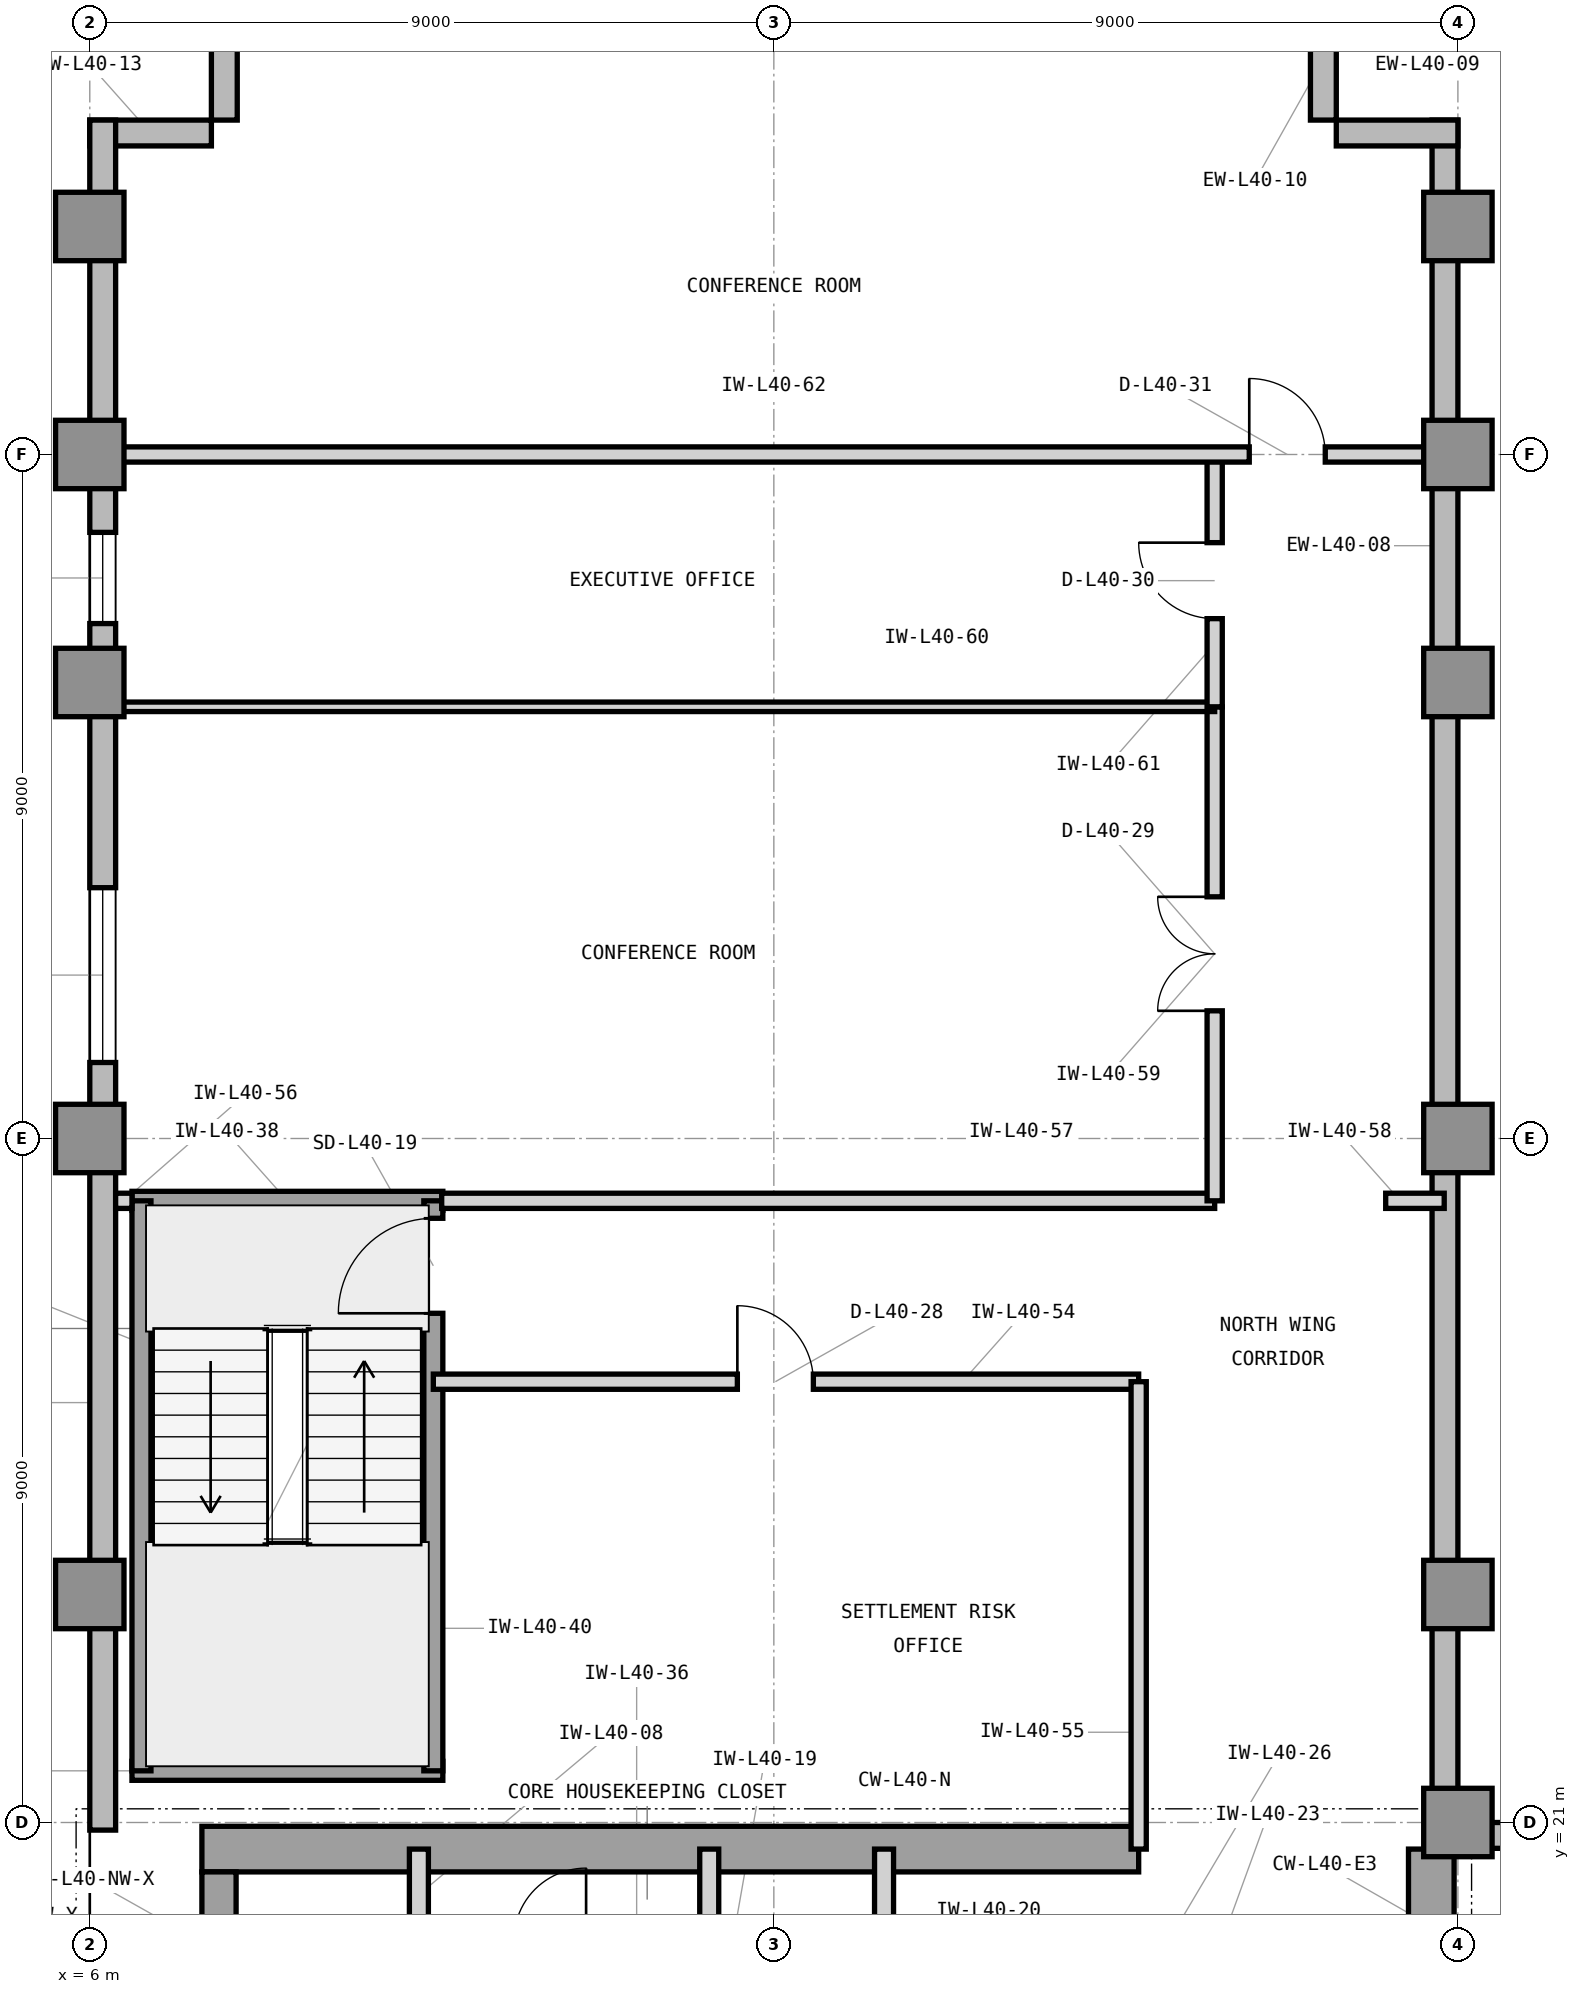
"""IFC4 building model, lengths in metres.
Left out: names, types, materials, properties, quantities, classifications, styles, units other than length and angle.
Written with IfcOpenShell. Run it as: python <this file> out.ifc"""

import sys

from ifc_helpers import new_model, si_unit, direction, frame, frame_2d, origin, origin_2d, place, context, subcontext, project, spatial, rectangle, extrude, element, fill, save


model = new_model("IFC4")
c1 = context("Model", 3, precision=1e-05, world=origin(), true_north=direction((0.0, 1.0)))
c2 = subcontext(c1, "Body", "Model", "MODEL_VIEW")
j1 = project(units=[si_unit("LENGTHUNIT", "METRE"), si_unit("PLANEANGLEUNIT", "RADIAN")], contexts=[c1])
p1 = place(None, origin())
s1 = spatial("IfcSite", under=j1, at=p1, CompositionType="ELEMENT")
p2 = place(p1, origin())
s2 = spatial("IfcBuilding", under=s1, at=p2, CompositionType="ELEMENT")
p3 = place(p2, frame((0.0, 0.0, 168.3)))
s3 = spatial("IfcBuildingStorey", under=s2, at=p3, CompositionType="ELEMENT", Elevation=168.3)
p4 = place(p3, frame((7.475, 20.65, 0.0), z_axis=(0.0, 0.0, 1.0), x_axis=(1.0, 0.0, 0.0)))
e1 = element("IfcWall", 1, at=p4, inside=s3, PredefinedType="SHEAR", context=c2, shape_type="SweptSolid", body=[
    extrude(rectangle(XDim=12.325, YDim=0.6, at=frame_2d((6.163, 0.0))), origin(), (0.0, 0.0, 1.0), 3.9),
])
p5 = place(p3, frame((23.65, 16.6, 0.0), z_axis=(0.0, 0.0, 1.0), x_axis=(0.0, 1.0, 0.0)))
e2 = element("IfcWall", 2, at=p5, inside=s3, PredefinedType="SHEAR", context=c2, shape_type="SweptSolid", body=[
    extrude(rectangle(XDim=4.05, YDim=0.6, at=frame_2d((2.025, 0.0))), origin(), (0.0, 0.0, 1.0), 3.9),
])
p6 = place(p3, frame((7.7, 19.575, 0.0), z_axis=(0.0, 0.0, 1.0), x_axis=(0.0, 1.0, 0.0)))
e3 = element("IfcWall", 3, at=p6, inside=s3, PredefinedType="SHEAR", context=c2, shape_type="SweptSolid", body=[
    extrude(rectangle(XDim=0.775, YDim=0.45, at=frame_2d((0.388, 0.0))), origin(), (0.0, 0.0, 1.0), 3.9),
])
for number, where, z_axis, x_axis in (
    (4, (24.0, 21.0, 0.0), (0.0, 0.0, 1.0), (1.0, 0.0, 0.0)),
    (5, (6.0, 24.0, 0.0), (0.0, 0.0, 1.0), (1.0, 0.0, 0.0)),
    (6, (24.0, 24.0, 0.0), (0.0, 0.0, 1.0), (1.0, 0.0, 0.0)),
    (7, (6.0, 30.0, 0.0), (0.0, 0.0, 1.0), (1.0, 0.0, 0.0)),
    (8, (24.0, 30.0, 0.0), (0.0, 0.0, 1.0), (1.0, 0.0, 0.0)),
    (9, (6.0, 36.0, 0.0), (0.0, 0.0, 1.0), (1.0, 0.0, 0.0)),
    (10, (24.0, 36.0, 0.0), (0.0, 0.0, 1.0), (1.0, 0.0, 0.0)),
    (11, (6.0, 39.0, 0.0), (0.0, 0.0, 1.0), (1.0, 0.0, 0.0)),
    (12, (24.0, 39.0, 0.0), (0.0, 0.0, 1.0), (1.0, 0.0, 0.0)),
    (13, (6.0, 42.0, 0.0), (0.0, 0.0, 1.0), (1.0, 0.0, 0.0)),
    (14, (24.0, 42.0, 0.0), (0.0, 0.0, 1.0), (1.0, 0.0, 0.0)),
):
    element("IfcColumn", number, at=place(p3, frame(where, z_axis=z_axis, x_axis=x_axis)), inside=s3, PredefinedType="COLUMN", context=c2, shape_type="SweptSolid", body=[
        extrude(rectangle(XDim=0.9, YDim=0.9, at=origin_2d()), origin(), (0.0, 0.0, 1.0), 3.9),
    ])
p7 = place(p3, frame((55.4, 20.83, 0.0), z_axis=(0.0, 0.0, 1.0), x_axis=(-1.0, 0.0, 0.0)))
e15 = element("IfcWall", 15, at=p7, inside=s3, PredefinedType="STANDARD", context=c2, shape_type="SweptSolid", body=[
    extrude(rectangle(XDim=31.4, YDim=0.34, at=frame_2d((15.7, 0.0))), origin(), (0.0, 0.0, 1.0), 3.7),
])
p8 = place(p7, frame((17.167, 0.0, 0.9)))
e16 = element("IfcOpeningElement", 16, at=p8, cuts=e15, PredefinedType="OPENING", context=c2, shape_type="SweptSolid", body=[
    extrude(rectangle(XDim=2.3, YDim=2.2, at=frame_2d((1.15, 1.1))), frame((0.0, 0.18, 0.0), z_axis=(0.0, -1.0, 0.0), x_axis=(1.0, 0.0, 0.0)), (0.0, 0.0, 1.0), 0.36),
])
p9 = place(p7, frame((29.046, 0.0, 0.9)))
e17 = element("IfcOpeningElement", 17, at=p9, cuts=e15, PredefinedType="OPENING", context=c2, shape_type="SweptSolid", body=[
    extrude(rectangle(XDim=1.6, YDim=2.2, at=frame_2d((0.8, 1.1))), frame((0.0, 0.18, 0.0), z_axis=(0.0, -1.0, 0.0), x_axis=(1.0, 0.0, 0.0)), (0.0, 0.0, 1.0), 0.36),
])
p10 = place(p7, frame((8.675, 0.0, 0.9)))
e18 = element("IfcOpeningElement", 18, at=p10, cuts=e15, PredefinedType="OPENING", context=c2, shape_type="SweptSolid", body=[
    extrude(rectangle(XDim=2.3, YDim=2.2, at=frame_2d((1.15, 1.1))), frame((0.0, 0.18, 0.0), z_axis=(0.0, -1.0, 0.0), x_axis=(1.0, 0.0, 0.0)), (0.0, 0.0, 1.0), 0.36),
])
p11 = place(p3, frame((23.83, 21.0, 0.0), z_axis=(0.0, 0.0, 1.0), x_axis=(0.0, 1.0, 0.0)))
e19 = element("IfcWall", 19, at=p11, inside=s3, PredefinedType="STANDARD", context=c2, shape_type="SweptSolid", body=[
    extrude(rectangle(XDim=22.4, YDim=0.34, at=frame_2d((11.2, 0.0))), origin(), (0.0, 0.0, 1.0), 3.7),
])
for number, where, z_axis, x_axis in (
    (20, (24.0, 43.23, 0.0), (0.0, 0.0, 1.0), (-1.0, 0.0, 0.0)),
    (21, (22.23, 43.4, 0.0), (0.0, 0.0, 1.0), (0.0, 1.0, 0.0)),
    (22, (7.77, 45.0, 0.0), (0.0, 0.0, 1.0), (0.0, -1.0, 0.0)),
    (23, (7.6, 43.23, 0.0), (0.0, 0.0, 1.0), (-1.0, 0.0, 0.0)),
):
    element("IfcWall", number, at=place(p3, frame(where, z_axis=z_axis, x_axis=x_axis)), inside=s3, PredefinedType="STANDARD", context=c2, shape_type="SweptSolid", body=[
        extrude(rectangle(XDim=1.6, YDim=0.34, at=frame_2d((0.8, 0.0))), origin(), (0.0, 0.0, 1.0), 3.7),
    ])
p12 = place(p3, frame((6.17, 43.4, 0.0), z_axis=(0.0, 0.0, 1.0), x_axis=(0.0, -1.0, 0.0)))
e24 = element("IfcWall", 24, at=p12, inside=s3, PredefinedType="STANDARD", context=c2, shape_type="SweptSolid", body=[
    extrude(rectangle(XDim=22.5, YDim=0.34, at=frame_2d((11.25, 0.0))), origin(), (0.0, 0.0, 1.0), 3.7),
])
p13 = place(p12, frame((10.1, 0.0, 0.9)))
e25 = element("IfcOpeningElement", 25, at=p13, cuts=e24, PredefinedType="OPENING", context=c2, shape_type="SweptSolid", body=[
    extrude(rectangle(XDim=2.3, YDim=2.2, at=frame_2d((1.15, 1.1))), frame((0.0, 0.18, 0.0), z_axis=(0.0, -1.0, 0.0), x_axis=(1.0, 0.0, 0.0)), (0.0, 0.0, 1.0), 0.36),
])
p14 = place(p12, frame((5.425, 0.0, 0.9)))
e26 = element("IfcOpeningElement", 26, at=p14, cuts=e24, PredefinedType="OPENING", context=c2, shape_type="SweptSolid", body=[
    extrude(rectangle(XDim=1.2, YDim=2.2, at=frame_2d((0.6, 1.1))), frame((0.0, 0.18, 0.0), z_axis=(0.0, -1.0, 0.0), x_axis=(1.0, 0.0, 0.0)), (0.0, 0.0, 1.0), 0.36),
])
p15 = place(p3, frame((10.33, 19.45, 0.0), z_axis=(0.0, 0.0, 1.0), x_axis=(0.0, 1.0, 0.0)))
e27 = element("IfcWall", 27, at=p15, inside=s3, PredefinedType="PARTITIONING", context=c2, shape_type="SweptSolid", body=[
    extrude(rectangle(XDim=1.2, YDim=0.25, at=frame_2d((0.6, 0.0))), origin(), (0.0, 0.0, 1.0), 3.073),
])
for number, where, z_axis, x_axis in (
    (28, (14.15, 16.7, 0.0), (0.0, 0.0, 1.0), (0.0, 1.0, 0.0)),
    (29, (16.45, 16.7, 0.0), (0.0, 0.0, 1.0), (0.0, 1.0, 0.0)),
):
    element("IfcWall", number, at=place(p3, frame(where, z_axis=z_axis, x_axis=x_axis)), inside=s3, PredefinedType="PARTITIONING", context=c2, shape_type="SweptSolid", body=[
        extrude(rectangle(XDim=3.95, YDim=0.25, at=frame_2d((1.975, 0.0))), origin(), (0.0, 0.0, 1.0), 3.69),
    ])
for number, where, z_axis, x_axis in (
    (30, (6.555, 21.68, 0.0), (0.0, 0.0, 1.0), (1.0, 0.0, 0.0)),
    (31, (6.555, 29.18, 0.0), (0.0, 0.0, 1.0), (1.0, 0.0, 0.0)),
):
    element("IfcWall", number, at=place(p3, frame(where, z_axis=z_axis, x_axis=x_axis)), inside=s3, PredefinedType="SHEAR", context=c2, shape_type="SweptSolid", body=[
        extrude(rectangle(XDim=4.09, YDim=0.25, at=frame_2d((2.045, 0.0))), origin(), (0.0, 0.0, 1.0), 3.9),
    ])
p16 = place(p3, frame((6.68, 21.68, 0.0), z_axis=(0.0, 0.0, 1.0), x_axis=(0.0, 1.0, 0.0)))
e32 = element("IfcWall", 32, at=p16, inside=s3, PredefinedType="SHEAR", context=c2, shape_type="SweptSolid", body=[
    extrude(rectangle(XDim=7.5, YDim=0.25, at=frame_2d((3.75, 0.0))), origin(), (0.0, 0.0, 1.0), 3.9),
])
p17 = place(p3, frame((10.52, 21.68, 0.0), z_axis=(0.0, 0.0, 1.0), x_axis=(0.0, 1.0, 0.0)))
e33 = element("IfcWall", 33, at=p17, inside=s3, PredefinedType="SHEAR", context=c2, shape_type="SweptSolid", body=[
    extrude(rectangle(XDim=7.5, YDim=0.25, at=frame_2d((3.75, 0.0))), origin(), (0.0, 0.0, 1.0), 3.9),
])
p18 = place(p17, frame((6.02, 0.0, 0.0)))
e34 = element("IfcOpeningElement", 34, at=p18, cuts=e33, PredefinedType="OPENING", context=c2, shape_type="SweptSolid", body=[
    extrude(rectangle(XDim=1.25, YDim=2.2, at=frame_2d((0.625, 1.1))), frame((0.0, 0.135, 0.0), z_axis=(0.0, -1.0, 0.0), x_axis=(1.0, 0.0, 0.0)), (0.0, 0.0, 1.0), 0.27),
])
p19 = place(p3, frame((10.52, 26.8, 0.0), z_axis=(0.0, 0.0, 1.0), x_axis=(1.0, 0.0, 0.0)))
e35 = element("IfcWall", 35, at=p19, inside=s3, PredefinedType="PARTITIONING", context=c2, shape_type="SweptSolid", body=[
    extrude(rectangle(XDim=9.28, YDim=0.2, at=frame_2d((4.64, 0.0))), origin(), (0.0, 0.0, 1.0), 3.69),
])
p20 = place(p19, frame((4.0, 0.0, 0.0)))
e36 = element("IfcOpeningElement", 36, at=p20, cuts=e35, PredefinedType="OPENING", context=c2, shape_type="SweptSolid", body=[
    extrude(rectangle(XDim=1.0, YDim=2.15, at=frame_2d((0.5, 1.075))), frame((0.0, 0.11, 0.0), z_axis=(0.0, -1.0, 0.0), x_axis=(1.0, 0.0, 0.0)), (0.0, 0.0, 1.0), 0.22),
])
p21 = place(p3, frame((19.8, 20.65, 0.0), z_axis=(0.0, 0.0, 1.0), x_axis=(0.0, 1.0, 0.0)))
e37 = element("IfcWall", 37, at=p21, inside=s3, PredefinedType="PARTITIONING", context=c2, shape_type="SweptSolid", body=[
    extrude(rectangle(XDim=6.15, YDim=0.2, at=frame_2d((3.075, 0.0))), origin(), (0.0, 0.0, 1.0), 3.69),
])
p22 = place(p3, frame((6.34, 29.18, 0.0), z_axis=(0.0, 0.0, 1.0), x_axis=(1.0, 0.0, 0.0)))
e38 = element("IfcWall", 38, at=p22, inside=s3, PredefinedType="PARTITIONING", context=c2, shape_type="SweptSolid", body=[
    extrude(rectangle(XDim=0.215, YDim=0.2, at=frame_2d((0.107, 0.0))), origin(), (0.0, 0.0, 1.0), 3.69),
])
p23 = place(p3, frame((10.63, 29.18, 0.0), z_axis=(0.0, 0.0, 1.0), x_axis=(1.0, 0.0, 0.0)))
e39 = element("IfcWall", 39, at=p23, inside=s3, PredefinedType="PARTITIONING", context=c2, shape_type="SweptSolid", body=[
    extrude(rectangle(XDim=10.17, YDim=0.2, at=frame_2d((5.085, 0.0))), origin(), (0.0, 0.0, 1.0), 3.69),
])
p24 = place(p3, frame((23.05, 29.18, 0.0), z_axis=(0.0, 0.0, 1.0), x_axis=(1.0, 0.0, 0.0)))
e40 = element("IfcWall", 40, at=p24, inside=s3, PredefinedType="PARTITIONING", context=c2, shape_type="SweptSolid", body=[
    extrude(rectangle(XDim=0.77, YDim=0.2, at=frame_2d((0.385, 0.0))), origin(), (0.0, 0.0, 1.0), 3.69),
])
p25 = place(p3, frame((20.8, 29.18, 0.0), z_axis=(0.0, 0.0, 1.0), x_axis=(0.0, 1.0, 0.0)))
e41 = element("IfcWall", 41, at=p25, inside=s3, PredefinedType="PARTITIONING", context=c2, shape_type="SweptSolid", body=[
    extrude(rectangle(XDim=6.5, YDim=0.2, at=frame_2d((3.25, 0.0))), origin(), (0.0, 0.0, 1.0), 3.69),
])
p26 = place(p25, frame((2.5, 0.0, 0.0)))
e42 = element("IfcOpeningElement", 42, at=p26, cuts=e41, PredefinedType="OPENING", context=c2, shape_type="SweptSolid", body=[
    extrude(rectangle(XDim=1.5, YDim=2.3, at=frame_2d((0.75, 1.15))), frame((0.0, 0.11, 0.0), z_axis=(0.0, -1.0, 0.0), x_axis=(1.0, 0.0, 0.0)), (0.0, 0.0, 1.0), 0.22),
])
p27 = place(p3, frame((6.18, 35.68, 0.0), z_axis=(0.0, 0.0, 1.0), x_axis=(1.0, 0.0, 0.0)))
e43 = element("IfcWall", 43, at=p27, inside=s3, PredefinedType="PARTITIONING", context=c2, shape_type="SweptSolid", body=[
    extrude(rectangle(XDim=14.62, YDim=0.125, at=frame_2d((7.31, 0.0))), origin(), (0.0, 0.0, 1.0), 3.69),
])
p28 = place(p3, frame((20.8, 35.68, 0.0), z_axis=(0.0, 0.0, 1.0), x_axis=(0.0, 1.0, 0.0)))
e44 = element("IfcWall", 44, at=p28, inside=s3, PredefinedType="PARTITIONING", context=c2, shape_type="SweptSolid", body=[
    extrude(rectangle(XDim=3.32, YDim=0.2, at=frame_2d((1.66, 0.0))), origin(), (0.0, 0.0, 1.0), 3.69),
])
p29 = place(p28, frame((1.16, 0.0, 0.0)))
e45 = element("IfcOpeningElement", 45, at=p29, cuts=e44, PredefinedType="OPENING", context=c2, shape_type="SweptSolid", body=[
    extrude(rectangle(XDim=1.0, YDim=2.15, at=frame_2d((0.5, 1.075))), frame((0.0, 0.11, 0.0), z_axis=(0.0, -1.0, 0.0), x_axis=(1.0, 0.0, 0.0)), (0.0, 0.0, 1.0), 0.22),
])
p30 = place(p3, frame((6.18, 39.0, 0.0), z_axis=(0.0, 0.0, 1.0), x_axis=(1.0, 0.0, 0.0)))
e46 = element("IfcWall", 46, at=p30, inside=s3, PredefinedType="PARTITIONING", context=c2, shape_type="SweptSolid", body=[
    extrude(rectangle(XDim=17.64, YDim=0.2, at=frame_2d((8.82, 0.0))), origin(), (0.0, 0.0, 1.0), 3.073),
])
p31 = place(p30, frame((15.075, 0.0, 0.0)))
e47 = element("IfcOpeningElement", 47, at=p31, cuts=e46, PredefinedType="OPENING", context=c2, shape_type="SweptSolid", body=[
    extrude(rectangle(XDim=1.0, YDim=2.15, at=frame_2d((0.5, 1.075))), frame((0.0, 0.11, 0.0), z_axis=(0.0, -1.0, 0.0), x_axis=(1.0, 0.0, 0.0)), (0.0, 0.0, 1.0), 0.22),
])
p32 = place(p13, origin())
e48 = element("IfcWindow", 48, at=p32, inside=s3, PartitioningType="SINGLE_PANEL", PredefinedType="WINDOW", context=c2, shape_type="SweptSolid", body=[
    extrude(rectangle(XDim=2.3, YDim=2.2, at=frame_2d((1.15, 1.1))), frame((0.0, 0.11, 0.0), z_axis=(0.0, -1.0, 0.0), x_axis=(1.0, 0.0, 0.0)), (0.0, 0.0, 1.0), 0.06),
])
fill(e25, e48)
p33 = place(p18, origin())
e49 = element("IfcDoor", 49, at=p33, inside=s3, OperationType="SINGLE_SWING_LEFT", PredefinedType="DOOR", context=c2, shape_type="SweptSolid", body=[
    extrude(rectangle(XDim=1.25, YDim=2.2, at=frame_2d((0.625, 1.1))), frame((0.0, 0.025, 0.0), z_axis=(0.0, -1.0, 0.0), x_axis=(1.0, 0.0, 0.0)), (0.0, 0.0, 1.0), 0.05),
])
fill(e34, e49)
p34 = place(p20, origin())
e50 = element("IfcDoor", 50, at=p34, inside=s3, OperationType="SINGLE_SWING_LEFT", PredefinedType="DOOR", context=c2, shape_type="SweptSolid", body=[
    extrude(rectangle(XDim=1.0, YDim=2.15, at=frame_2d((0.5, 1.075))), frame((0.0, 0.025, 0.0), z_axis=(0.0, -1.0, 0.0), x_axis=(1.0, 0.0, 0.0)), (0.0, 0.0, 1.0), 0.05),
])
fill(e36, e50)
p35 = place(p26, origin())
e51 = element("IfcDoor", 51, at=p35, inside=s3, OperationType="DOUBLE_DOOR_SINGLE_SWING", PredefinedType="DOOR", context=c2, shape_type="SweptSolid", body=[
    extrude(rectangle(XDim=1.5, YDim=2.3, at=frame_2d((0.75, 1.15))), frame((0.0, 0.025, 0.0), z_axis=(0.0, -1.0, 0.0), x_axis=(1.0, 0.0, 0.0)), (0.0, 0.0, 1.0), 0.05),
])
fill(e42, e51)
p36 = place(p29, origin())
e52 = element("IfcDoor", 52, at=p36, inside=s3, OperationType="SINGLE_SWING_RIGHT", PredefinedType="DOOR", context=c2, shape_type="SweptSolid", body=[
    extrude(rectangle(XDim=1.0, YDim=2.15, at=frame_2d((0.5, 1.075))), frame((0.0, 0.025, 0.0), z_axis=(0.0, -1.0, 0.0), x_axis=(1.0, 0.0, 0.0)), (0.0, 0.0, 1.0), 0.05),
])
fill(e45, e52)
p37 = place(p31, origin())
e53 = element("IfcDoor", 53, at=p37, inside=s3, OperationType="SINGLE_SWING_LEFT", PredefinedType="DOOR", context=c2, shape_type="SweptSolid", body=[
    extrude(rectangle(XDim=1.0, YDim=2.15, at=frame_2d((0.5, 1.075))), frame((0.0, 0.025, 0.0), z_axis=(0.0, -1.0, 0.0), x_axis=(1.0, 0.0, 0.0)), (0.0, 0.0, 1.0), 0.05),
])
fill(e47, e53)
p38 = place(p14, origin())
e54 = element("IfcWindow", 54, at=p38, inside=s3, PartitioningType="SINGLE_PANEL", PredefinedType="WINDOW", context=c2, shape_type="SweptSolid", body=[
    extrude(rectangle(XDim=1.2, YDim=2.2, at=frame_2d((0.6, 1.1))), frame((0.0, 0.11, 0.0), z_axis=(0.0, -1.0, 0.0), x_axis=(1.0, 0.0, 0.0)), (0.0, 0.0, 1.0), 0.06),
])
fill(e26, e54)
save(model, sys.argv[1])
